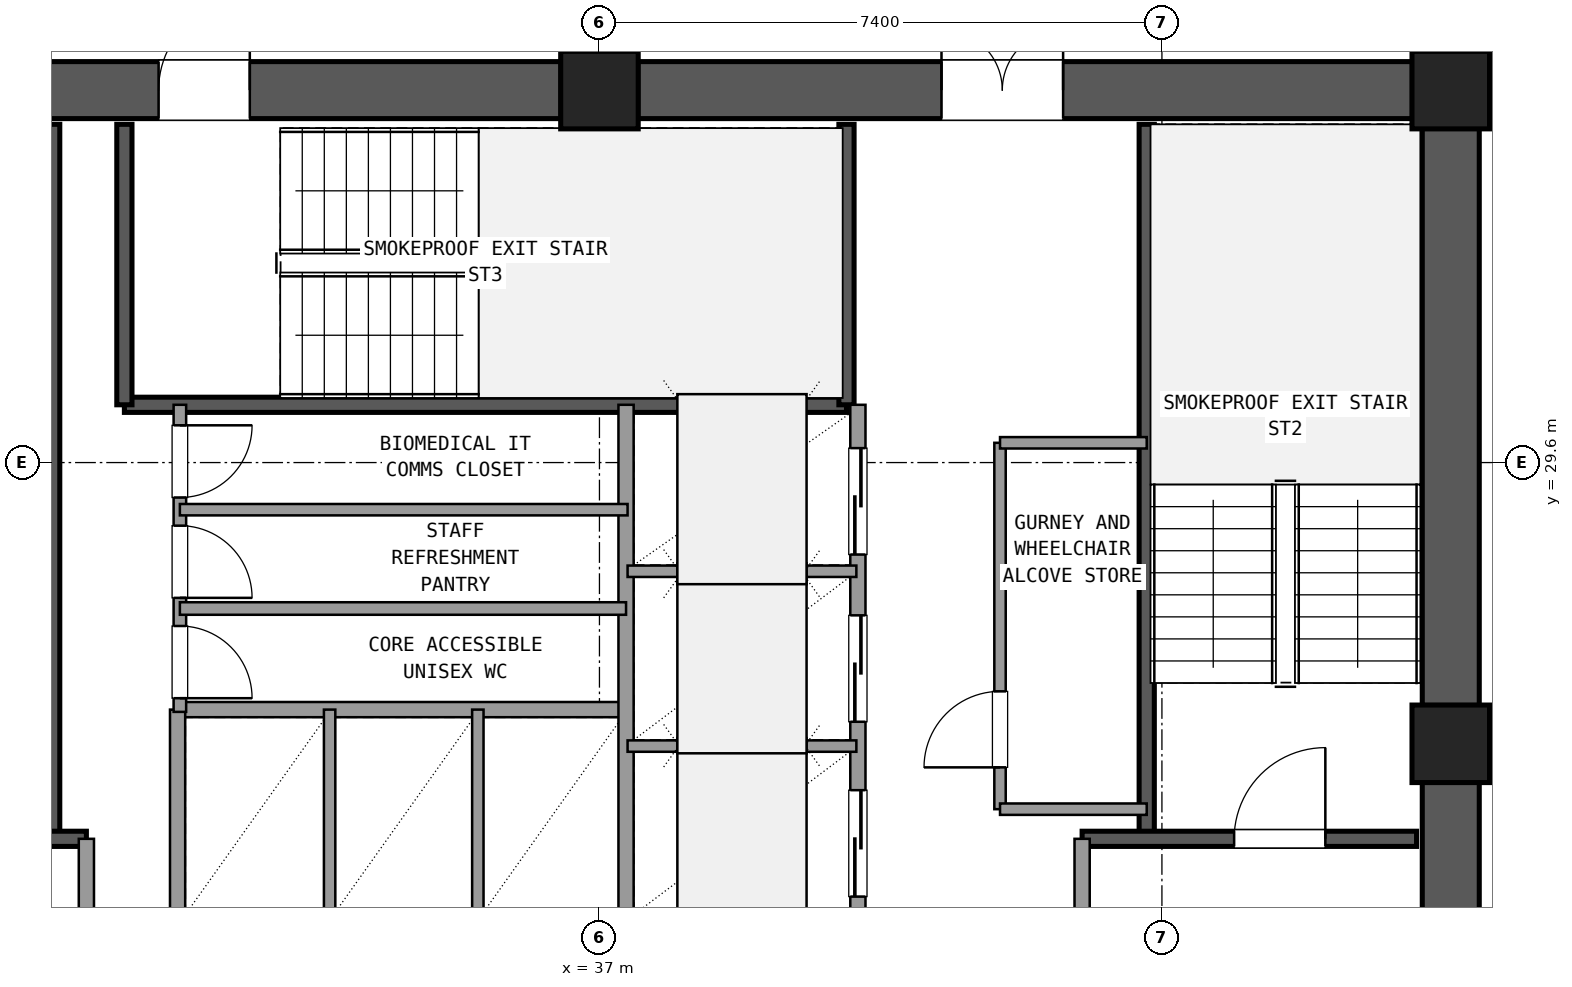
"""IFC4 building model, lengths in metres.
Left out: names, types, materials, properties, quantities, classifications, styles, units other than length and angle.
Written with IfcOpenShell. Run it as: python <this file> out.ifc"""

import sys

from ifc_helpers import new_model, si_unit, direction, frame, frame_2d, origin, origin_2d, place, context, subcontext, project, spatial, rectangle, extrude, element, fill, save


model = new_model("IFC4")
c1 = context("Model", 3, precision=1e-05, world=origin(), true_north=direction((0.0, 1.0)))
c2 = subcontext(c1, "Body", "Model", "MODEL_VIEW")
j1 = project(units=[si_unit("LENGTHUNIT", "METRE"), si_unit("PLANEANGLEUNIT", "RADIAN")], contexts=[c1])
p1 = place(None, origin())
s1 = spatial("IfcSite", under=j1, at=p1, CompositionType="ELEMENT")
p2 = place(p1, origin())
s2 = spatial("IfcBuilding", under=s1, at=p2, CompositionType="ELEMENT")
p3 = place(p2, frame((0.0, 0.0, 106.38)))
s3 = spatial("IfcBuildingStorey", under=s2, at=p3, CompositionType="ELEMENT", Elevation=106.38)
for number, where, z_axis, x_axis in (
    (1, (48.2, 25.9, 0.0), (0.0, 0.0, 1.0), (1.0, 0.0, 0.0)),
    (2, (48.2, 34.5, 0.0), (0.0, 0.0, 1.0), (1.0, 0.0, 0.0)),
    (3, (37.0, 34.5, 0.0), (0.0, 0.0, 1.0), (1.0, 0.0, 0.0)),
):
    element("IfcColumn", number, at=place(p3, frame(where, z_axis=z_axis, x_axis=x_axis)), inside=s3, PredefinedType="COLUMN", context=c2, shape_type="SweptSolid", body=[
        extrude(rectangle(XDim=1.02, YDim=1.02, at=origin_2d()), origin(), (0.0, 0.0, 1.0), 3.6),
    ])
p4 = place(p3, frame((48.2, 17.805, 0.0), z_axis=(0.0, 0.0, 1.0), x_axis=(0.0, 1.0, 0.0)))
e4 = element("IfcWall", 4, at=p4, inside=s3, PredefinedType="SHEAR", context=c2, shape_type="SweptSolid", body=[
    extrude(rectangle(XDim=7.59, YDim=0.75, at=frame_2d((3.795, 0.0))), origin(), (0.0, 0.0, 1.0), 3.32),
])
p5 = place(p4, frame((4.245, 0.0, 0.0)))
e5 = element("IfcOpeningElement", 5, at=p5, cuts=e4, PredefinedType="OPENING", context=c2, shape_type="SweptSolid", body=[
    extrude(rectangle(XDim=1.2, YDim=2.15, at=frame_2d((0.6, 1.075))), frame((0.0, 0.385, 0.0), z_axis=(0.0, -1.0, 0.0), x_axis=(1.0, 0.0, 0.0)), (0.0, 0.0, 1.0), 0.77),
])
p6 = place(p3, frame((48.2, 26.405, 0.0), z_axis=(0.0, 0.0, 1.0), x_axis=(0.0, 1.0, 0.0)))
e6 = element("IfcWall", 6, at=p6, inside=s3, PredefinedType="SHEAR", context=c2, shape_type="SweptSolid", body=[
    extrude(rectangle(XDim=7.59, YDim=0.75, at=frame_2d((3.795, 0.0))), origin(), (0.0, 0.0, 1.0), 3.32),
])
p7 = place(p3, frame((47.695, 34.5, 0.0), z_axis=(0.0, 0.0, 1.0), x_axis=(-1.0, 0.0, 0.0)))
e7 = element("IfcWall", 7, at=p7, inside=s3, PredefinedType="SHEAR", context=c2, shape_type="SweptSolid", body=[
    extrude(rectangle(XDim=10.19, YDim=0.75, at=frame_2d((5.095, 0.0))), origin(), (0.0, 0.0, 1.0), 3.32),
])
p8 = place(p7, frame((4.595, 0.0, 0.0)))
e8 = element("IfcOpeningElement", 8, at=p8, cuts=e7, PredefinedType="OPENING", context=c2, shape_type="SweptSolid", body=[
    extrude(rectangle(XDim=1.6, YDim=2.2, at=frame_2d((0.8, 1.1))), frame((0.0, 0.385, 0.0), z_axis=(0.0, -1.0, 0.0), x_axis=(1.0, 0.0, 0.0)), (0.0, 0.0, 1.0), 0.77),
])
p9 = place(p3, frame((36.495, 34.5, 0.0), z_axis=(0.0, 0.0, 1.0), x_axis=(-1.0, 0.0, 0.0)))
e9 = element("IfcWall", 9, at=p9, inside=s3, PredefinedType="SHEAR", context=c2, shape_type="SweptSolid", body=[
    extrude(rectangle(XDim=10.19, YDim=0.75, at=frame_2d((5.095, 0.0))), origin(), (0.0, 0.0, 1.0), 3.32),
])
p10 = place(p9, frame((4.095, 0.0, 0.0)))
e10 = element("IfcOpeningElement", 10, at=p10, cuts=e9, PredefinedType="OPENING", context=c2, shape_type="SweptSolid", body=[
    extrude(rectangle(XDim=1.2, YDim=2.15, at=frame_2d((0.6, 1.075))), frame((0.0, 0.385, 0.0), z_axis=(0.0, -1.0, 0.0), x_axis=(1.0, 0.0, 0.0)), (0.0, 0.0, 1.0), 0.77),
])
p11 = place(p3, frame((29.8, 24.65, 0.0), z_axis=(0.0, 0.0, 1.0), x_axis=(0.0, 1.0, 0.0)))
e11 = element("IfcWall", 11, at=p11, inside=s3, PredefinedType="SHEAR", context=c2, shape_type="SweptSolid", body=[
    extrude(rectangle(XDim=9.4, YDim=0.2, at=frame_2d((4.7, 0.0))), origin(), (0.0, 0.0, 1.0), 3.32),
])
p12 = place(p3, frame((26.25, 24.65, 0.0), z_axis=(0.0, 0.0, 1.0), x_axis=(1.0, 0.0, 0.0)))
e12 = element("IfcWall", 12, at=p12, inside=s3, PredefinedType="SHEAR", context=c2, shape_type="SweptSolid", body=[
    extrude(rectangle(XDim=4.0, YDim=0.2, at=frame_2d((2.0, 0.0))), origin(), (0.0, 0.0, 1.0), 3.32),
])
p13 = place(p12, frame((1.0, 0.0, 0.0)))
e13 = element("IfcOpeningElement", 13, at=p13, cuts=e12, PredefinedType="OPENING", context=c2, shape_type="SweptSolid", body=[
    extrude(rectangle(XDim=1.2, YDim=2.15, at=frame_2d((0.6, 1.075))), frame((0.0, 0.11, 0.0), z_axis=(0.0, -1.0, 0.0), x_axis=(1.0, 0.0, 0.0)), (0.0, 0.0, 1.0), 0.22),
])
p14 = place(p3, frame((44.2, 24.65, 0.0), z_axis=(0.0, 0.0, 1.0), x_axis=(0.0, 1.0, 0.0)))
e14 = element("IfcWall", 14, at=p14, inside=s3, PredefinedType="SHEAR", context=c2, shape_type="SweptSolid", body=[
    extrude(rectangle(XDim=9.4, YDim=0.2, at=frame_2d((4.7, 0.0))), origin(), (0.0, 0.0, 1.0), 3.32),
])
p15 = place(p3, frame((43.35, 24.65, 0.0), z_axis=(0.0, 0.0, 1.0), x_axis=(1.0, 0.0, 0.0)))
e15 = element("IfcWall", 15, at=p15, inside=s3, PredefinedType="SHEAR", context=c2, shape_type="SweptSolid", body=[
    extrude(rectangle(XDim=4.4, YDim=0.2, at=frame_2d((2.2, 0.0))), origin(), (0.0, 0.0, 1.0), 3.32),
])
p16 = place(p15, frame((2.0, 0.0, 0.0)))
e16 = element("IfcOpeningElement", 16, at=p16, cuts=e15, PredefinedType="OPENING", context=c2, shape_type="SweptSolid", body=[
    extrude(rectangle(XDim=1.2, YDim=2.15, at=frame_2d((0.6, 1.075))), frame((0.0, 0.11, 0.0), z_axis=(0.0, -1.0, 0.0), x_axis=(1.0, 0.0, 0.0)), (0.0, 0.0, 1.0), 0.22),
])
p17 = place(p3, frame((30.75, 30.36, 0.0), z_axis=(0.0, 0.0, 1.0), x_axis=(1.0, 0.0, 0.0)))
e17 = element("IfcWall", 17, at=p17, inside=s3, PredefinedType="SHEAR", context=c2, shape_type="SweptSolid", body=[
    extrude(rectangle(XDim=9.5, YDim=0.2, at=frame_2d((4.75, 0.0))), origin(), (0.0, 0.0, 1.0), 3.32),
])
for number, where, z_axis, x_axis in (
    (18, (30.75, 30.36, 0.0), (0.0, 0.0, 1.0), (0.0, 1.0, 0.0)),
    (19, (40.25, 30.36, 0.0), (0.0, 0.0, 1.0), (0.0, 1.0, 0.0)),
):
    element("IfcWall", number, at=place(p3, frame(where, z_axis=z_axis, x_axis=x_axis)), inside=s3, PredefinedType="SHEAR", context=c2, shape_type="SweptSolid", body=[
        extrude(rectangle(XDim=3.69, YDim=0.2, at=frame_2d((1.845, 0.0))), origin(), (0.0, 0.0, 1.0), 3.32),
    ])
p18 = place(p3, frame((30.25, 17.75, 0.0), z_axis=(0.0, 0.0, 1.0), x_axis=(0.0, 1.0, 0.0)))
e20 = element("IfcWall", 20, at=p18, inside=s3, PredefinedType="SOLIDWALL", context=c2, shape_type="SweptSolid", body=[
    extrude(rectangle(XDim=6.9, YDim=0.2, at=frame_2d((3.45, 0.0))), origin(), (0.0, 0.0, 1.0), 2.61),
])
p19 = place(p18, frame((4.15, 0.0, 0.0)))
e21 = element("IfcOpeningElement", 21, at=p19, cuts=e20, PredefinedType="OPENING", context=c2, shape_type="SweptSolid", body=[
    extrude(rectangle(XDim=1.2, YDim=2.15, at=frame_2d((0.6, 1.075))), frame((0.0, 0.11, 0.0), z_axis=(0.0, -1.0, 0.0), x_axis=(1.0, 0.0, 0.0)), (0.0, 0.0, 1.0), 0.22),
])
p20 = place(p3, frame((43.35, 17.75, 0.0), z_axis=(0.0, 0.0, 1.0), x_axis=(0.0, 1.0, 0.0)))
e22 = element("IfcWall", 22, at=p20, inside=s3, PredefinedType="SOLIDWALL", context=c2, shape_type="SweptSolid", body=[
    extrude(rectangle(XDim=6.9, YDim=0.2, at=frame_2d((3.45, 0.0))), origin(), (0.0, 0.0, 1.0), 2.61),
])
p21 = place(p20, frame((4.15, 0.0, 0.0)))
e23 = element("IfcOpeningElement", 23, at=p21, cuts=e22, PredefinedType="OPENING", context=c2, shape_type="SweptSolid", body=[
    extrude(rectangle(XDim=1.2, YDim=2.15, at=frame_2d((0.6, 1.075))), frame((0.0, 0.11, 0.0), z_axis=(0.0, -1.0, 0.0), x_axis=(1.0, 0.0, 0.0)), (0.0, 0.0, 1.0), 0.22),
])
p22 = place(p3, frame((31.45, 26.35, 0.0), z_axis=(0.0, 0.0, 1.0), x_axis=(1.0, 0.0, 0.0)))
e24 = element("IfcWall", 24, at=p22, inside=s3, PredefinedType="SOLIDWALL", context=c2, shape_type="SweptSolid", body=[
    extrude(rectangle(XDim=5.9, YDim=0.2, at=frame_2d((2.95, 0.0))), origin(), (0.0, 0.0, 1.0), 2.61),
])
p23 = place(p3, frame((31.45, 23.54, 0.0), z_axis=(0.0, 0.0, 1.0), x_axis=(0.0, 1.0, 0.0)))
e25 = element("IfcWall", 25, at=p23, inside=s3, PredefinedType="SOLIDWALL", context=c2, shape_type="SweptSolid", body=[
    extrude(rectangle(XDim=2.81, YDim=0.2, at=frame_2d((1.405, 0.0))), origin(), (0.0, 0.0, 1.0), 2.61),
])
for number, where, z_axis, x_axis in (
    (26, (33.45, 23.54, 0.0), (0.0, 0.0, 1.0), (0.0, 1.0, 0.0)),
    (27, (35.4, 23.54, 0.0), (0.0, 0.0, 1.0), (0.0, 1.0, 0.0)),
):
    element("IfcWall", number, at=place(p3, frame(where, z_axis=z_axis, x_axis=x_axis)), inside=s3, PredefinedType="PARTITIONING", context=c2, shape_type="SweptSolid", body=[
        extrude(rectangle(XDim=2.81, YDim=0.15, at=frame_2d((1.405, 0.0))), origin(), (0.0, 0.0, 1.0), 2.61),
    ])
p24 = place(p3, frame((37.35, 23.54, 0.0), z_axis=(0.0, 0.0, 1.0), x_axis=(0.0, 1.0, 0.0)))
e28 = element("IfcWall", 28, at=p24, inside=s3, PredefinedType="SOLIDWALL", context=c2, shape_type="SweptSolid", body=[
    extrude(rectangle(XDim=6.82, YDim=0.2, at=frame_2d((3.41, 0.0))), origin(), (0.0, 0.0, 1.0), 2.61),
])
p25 = place(p3, frame((40.4, 23.54, 0.0), z_axis=(0.0, 0.0, 1.0), x_axis=(0.0, 1.0, 0.0)))
e29 = element("IfcWall", 29, at=p25, inside=s3, PredefinedType="SOLIDWALL", context=c2, shape_type="SweptSolid", body=[
    extrude(rectangle(XDim=6.82, YDim=0.2, at=frame_2d((3.41, 0.0))), origin(), (0.0, 0.0, 1.0), 2.61),
])
p26 = place(p25, frame((0.35, 0.0, 0.0)))
e30 = element("IfcOpeningElement", 30, at=p26, cuts=e29, PredefinedType="OPENING", context=c2, shape_type="SweptSolid", body=[
    extrude(rectangle(XDim=1.4, YDim=2.2, at=frame_2d((0.7, 1.1))), frame((0.0, 0.11, 0.0), z_axis=(0.0, -1.0, 0.0), x_axis=(1.0, 0.0, 0.0)), (0.0, 0.0, 1.0), 0.22),
])
p27 = place(p25, frame((2.65, 0.0, 0.0)))
e31 = element("IfcOpeningElement", 31, at=p27, cuts=e29, PredefinedType="OPENING", context=c2, shape_type="SweptSolid", body=[
    extrude(rectangle(XDim=1.4, YDim=2.2, at=frame_2d((0.7, 1.1))), frame((0.0, 0.11, 0.0), z_axis=(0.0, -1.0, 0.0), x_axis=(1.0, 0.0, 0.0)), (0.0, 0.0, 1.0), 0.22),
])
p28 = place(p25, frame((4.85, 0.0, 0.0)))
e32 = element("IfcOpeningElement", 32, at=p28, cuts=e29, PredefinedType="OPENING", context=c2, shape_type="SweptSolid", body=[
    extrude(rectangle(XDim=1.4, YDim=2.2, at=frame_2d((0.7, 1.1))), frame((0.0, 0.11, 0.0), z_axis=(0.0, -1.0, 0.0), x_axis=(1.0, 0.0, 0.0)), (0.0, 0.0, 1.0), 0.22),
])
for number, where, z_axis, x_axis in (
    (33, (37.37, 25.87, 0.0), (0.0, 0.0, 1.0), (1.0, 0.0, 0.0)),
    (34, (37.37, 28.17, 0.0), (0.0, 0.0, 1.0), (1.0, 0.0, 0.0)),
):
    element("IfcWall", number, at=place(p3, frame(where, z_axis=z_axis, x_axis=x_axis)), inside=s3, PredefinedType="PARTITIONING", context=c2, shape_type="SweptSolid", body=[
        extrude(rectangle(XDim=3.01, YDim=0.15, at=frame_2d((1.505, 0.0))), origin(), (0.0, 0.0, 1.0), 2.61),
    ])
p29 = place(p3, frame((42.27, 25.04, 0.0), z_axis=(0.0, 0.0, 1.0), x_axis=(0.0, 1.0, 0.0)))
e35 = element("IfcWall", 35, at=p29, inside=s3, PredefinedType="PARTITIONING", context=c2, shape_type="SweptSolid", body=[
    extrude(rectangle(XDim=4.82, YDim=0.15, at=frame_2d((2.41, 0.0))), origin(), (0.0, 0.0, 1.0), 2.61),
])
p30 = place(p29, frame((0.55, 0.0, 0.0)))
e36 = element("IfcOpeningElement", 36, at=p30, cuts=e35, PredefinedType="OPENING", context=c2, shape_type="SweptSolid", body=[
    extrude(rectangle(XDim=1.0, YDim=2.15, at=frame_2d((0.5, 1.075))), frame((0.0, 0.085, 0.0), z_axis=(0.0, -1.0, 0.0), x_axis=(1.0, 0.0, 0.0)), (0.0, 0.0, 1.0), 0.17),
])
for number, where, z_axis, x_axis in (
    (37, (42.27, 25.04, 0.0), (0.0, 0.0, 1.0), (1.0, 0.0, 0.0)),
    (38, (42.27, 29.86, 0.0), (0.0, 0.0, 1.0), (1.0, 0.0, 0.0)),
):
    element("IfcWall", number, at=place(p3, frame(where, z_axis=z_axis, x_axis=x_axis)), inside=s3, PredefinedType="PARTITIONING", context=c2, shape_type="SweptSolid", body=[
        extrude(rectangle(XDim=1.93, YDim=0.15, at=frame_2d((0.965, 0.0))), origin(), (0.0, 0.0, 1.0), 2.61),
    ])
p31 = place(p3, frame((31.48, 26.32, 0.0), z_axis=(0.0, 0.0, 1.0), x_axis=(0.0, 1.0, 0.0)))
e39 = element("IfcWall", 39, at=p31, inside=s3, PredefinedType="PLUMBINGWALL", context=c2, shape_type="SweptSolid", body=[
    extrude(rectangle(XDim=4.04, YDim=0.165, at=frame_2d((2.02, 0.0))), origin(), (0.0, 0.0, 1.0), 2.61),
])
p32 = place(p31, frame((0.18, 0.0, 0.0)))
e40 = element("IfcOpeningElement", 40, at=p32, cuts=e39, PredefinedType="OPENING", context=c2, shape_type="SweptSolid", body=[
    extrude(rectangle(XDim=0.95, YDim=2.1, at=frame_2d((0.475, 1.05))), frame((0.0, 0.093, 0.0), z_axis=(0.0, -1.0, 0.0), x_axis=(1.0, 0.0, 0.0)), (0.0, 0.0, 1.0), 0.185),
])
p33 = place(p31, frame((1.5, 0.0, 0.0)))
e41 = element("IfcOpeningElement", 41, at=p33, cuts=e39, PredefinedType="OPENING", context=c2, shape_type="SweptSolid", body=[
    extrude(rectangle(XDim=0.95, YDim=2.1, at=frame_2d((0.475, 1.05))), frame((0.0, 0.093, 0.0), z_axis=(0.0, -1.0, 0.0), x_axis=(1.0, 0.0, 0.0)), (0.0, 0.0, 1.0), 0.185),
])
p34 = place(p31, frame((2.82, 0.0, 0.0)))
e42 = element("IfcOpeningElement", 42, at=p34, cuts=e39, PredefinedType="OPENING", context=c2, shape_type="SweptSolid", body=[
    extrude(rectangle(XDim=0.95, YDim=2.1, at=frame_2d((0.475, 1.05))), frame((0.0, 0.093, 0.0), z_axis=(0.0, -1.0, 0.0), x_axis=(1.0, 0.0, 0.0)), (0.0, 0.0, 1.0), 0.185),
])
p35 = place(p3, frame((31.48, 27.68, 0.0), z_axis=(0.0, 0.0, 1.0), x_axis=(1.0, 0.0, 0.0)))
e43 = element("IfcWall", 43, at=p35, inside=s3, PredefinedType="PLUMBINGWALL", context=c2, shape_type="SweptSolid", body=[
    extrude(rectangle(XDim=5.87, YDim=0.165, at=frame_2d((2.935, 0.0))), origin(), (0.0, 0.0, 1.0), 2.61),
])
p36 = place(p3, frame((31.48, 28.98, 0.0), z_axis=(0.0, 0.0, 1.0), x_axis=(1.0, 0.0, 0.0)))
e44 = element("IfcWall", 44, at=p36, inside=s3, PredefinedType="PARTITIONING", context=c2, shape_type="SweptSolid", body=[
    extrude(rectangle(XDim=5.89, YDim=0.15, at=frame_2d((2.945, 0.0))), origin(), (0.0, 0.0, 1.0), 2.61),
])
p37 = place(p3, frame((37.0, 34.95, 0.0), z_axis=(0.0, 0.0, 1.0), x_axis=(0.0, 1.0, 0.0)))
e45 = element("IfcWall", 45, at=p37, inside=s3, PredefinedType="PARTITIONING", context=c2, shape_type="SweptSolid", body=[
    extrude(rectangle(XDim=3.21, YDim=0.18, at=frame_2d((1.605, 0.0))), origin(), (0.0, 0.0, 1.0), 2.61),
])
p38 = place(p37, frame((0.605, 0.0, 0.0)))
e46 = element("IfcOpeningElement", 46, at=p38, cuts=e45, PredefinedType="OPENING", context=c2, shape_type="SweptSolid", body=[
    extrude(rectangle(XDim=2.0, YDim=2.2, at=frame_2d((1.0, 1.1))), frame((0.0, 0.1, 0.0), z_axis=(0.0, -1.0, 0.0), x_axis=(1.0, 0.0, 0.0)), (0.0, 0.0, 1.0), 0.2),
])
p39 = place(p16, origin())
e47 = element("IfcDoor", 47, at=p39, inside=s3, OperationType="SINGLE_SWING_RIGHT", PredefinedType="DOOR", context=c2, shape_type="SweptSolid", body=[
    extrude(rectangle(XDim=1.2, YDim=2.15, at=frame_2d((0.6, 1.075))), frame((0.0, 0.025, 0.0), z_axis=(0.0, -1.0, 0.0), x_axis=(1.0, 0.0, 0.0)), (0.0, 0.0, 1.0), 0.05),
])
fill(e16, e47)
p40 = place(p8, frame((1.6, 0.0, 0.0), z_axis=(0.0, 0.0, 1.0), x_axis=(-1.0, 0.0, 0.0)))
e48 = element("IfcDoor", 48, at=p40, inside=s3, OperationType="DOUBLE_DOOR_SINGLE_SWING", PredefinedType="DOOR", context=c2, shape_type="SweptSolid", body=[
    extrude(rectangle(XDim=1.6, YDim=2.2, at=frame_2d((0.8, 1.1))), frame((0.0, 0.025, 0.0), z_axis=(0.0, -1.0, 0.0), x_axis=(1.0, 0.0, 0.0)), (0.0, 0.0, 1.0), 0.05),
])
fill(e8, e48)
p41 = place(p10, frame((1.2, 0.0, 0.0), z_axis=(0.0, 0.0, 1.0), x_axis=(-1.0, 0.0, 0.0)))
e49 = element("IfcDoor", 49, at=p41, inside=s3, OperationType="SINGLE_SWING_LEFT", PredefinedType="DOOR", context=c2, shape_type="SweptSolid", body=[
    extrude(rectangle(XDim=1.2, YDim=2.15, at=frame_2d((0.6, 1.075))), frame((0.0, 0.025, 0.0), z_axis=(0.0, -1.0, 0.0), x_axis=(1.0, 0.0, 0.0)), (0.0, 0.0, 1.0), 0.05),
])
fill(e10, e49)
p42 = place(p26, origin())
e50 = element("IfcDoor", 50, at=p42, inside=s3, OperationType="SLIDING_TO_LEFT", PredefinedType="DOOR", context=c2, shape_type="SweptSolid", body=[
    extrude(rectangle(XDim=1.4, YDim=2.2, at=frame_2d((0.7, 1.1))), frame((0.0, 0.025, 0.0), z_axis=(0.0, -1.0, 0.0), x_axis=(1.0, 0.0, 0.0)), (0.0, 0.0, 1.0), 0.05),
])
fill(e30, e50)
p43 = place(p27, origin())
e51 = element("IfcDoor", 51, at=p43, inside=s3, OperationType="SLIDING_TO_LEFT", PredefinedType="DOOR", context=c2, shape_type="SweptSolid", body=[
    extrude(rectangle(XDim=1.4, YDim=2.2, at=frame_2d((0.7, 1.1))), frame((0.0, 0.025, 0.0), z_axis=(0.0, -1.0, 0.0), x_axis=(1.0, 0.0, 0.0)), (0.0, 0.0, 1.0), 0.05),
])
fill(e31, e51)
p44 = place(p28, origin())
e52 = element("IfcDoor", 52, at=p44, inside=s3, OperationType="SLIDING_TO_RIGHT", PredefinedType="DOOR", context=c2, shape_type="SweptSolid", body=[
    extrude(rectangle(XDim=1.4, YDim=2.2, at=frame_2d((0.7, 1.1))), frame((0.0, 0.025, 0.0), z_axis=(0.0, -1.0, 0.0), x_axis=(1.0, 0.0, 0.0)), (0.0, 0.0, 1.0), 0.05),
])
fill(e32, e52)
p45 = place(p30, origin())
e53 = element("IfcDoor", 53, at=p45, inside=s3, OperationType="SINGLE_SWING_LEFT", PredefinedType="DOOR", context=c2, shape_type="SweptSolid", body=[
    extrude(rectangle(XDim=1.0, YDim=2.15, at=frame_2d((0.5, 1.075))), frame((0.0, 0.025, 0.0), z_axis=(0.0, -1.0, 0.0), x_axis=(1.0, 0.0, 0.0)), (0.0, 0.0, 1.0), 0.05),
])
fill(e36, e53)
p46 = place(p32, frame((0.95, 0.0, 0.0), z_axis=(0.0, 0.0, 1.0), x_axis=(-1.0, 0.0, 0.0)))
e54 = element("IfcDoor", 54, at=p46, inside=s3, OperationType="SINGLE_SWING_LEFT", PredefinedType="DOOR", context=c2, shape_type="SweptSolid", body=[
    extrude(rectangle(XDim=0.95, YDim=2.1, at=frame_2d((0.475, 1.05))), frame((0.0, 0.025, 0.0), z_axis=(0.0, -1.0, 0.0), x_axis=(1.0, 0.0, 0.0)), (0.0, 0.0, 1.0), 0.05),
])
fill(e40, e54)
p47 = place(p33, frame((0.95, 0.0, 0.0), z_axis=(0.0, 0.0, 1.0), x_axis=(-1.0, 0.0, 0.0)))
e55 = element("IfcDoor", 55, at=p47, inside=s3, OperationType="SINGLE_SWING_LEFT", PredefinedType="DOOR", context=c2, shape_type="SweptSolid", body=[
    extrude(rectangle(XDim=0.95, YDim=2.1, at=frame_2d((0.475, 1.05))), frame((0.0, 0.025, 0.0), z_axis=(0.0, -1.0, 0.0), x_axis=(1.0, 0.0, 0.0)), (0.0, 0.0, 1.0), 0.05),
])
fill(e41, e55)
p48 = place(p34, frame((0.95, 0.0, 0.0), z_axis=(0.0, 0.0, 1.0), x_axis=(-1.0, 0.0, 0.0)))
e56 = element("IfcDoor", 56, at=p48, inside=s3, OperationType="SINGLE_SWING_RIGHT", PredefinedType="DOOR", context=c2, shape_type="SweptSolid", body=[
    extrude(rectangle(XDim=0.95, YDim=2.1, at=frame_2d((0.475, 1.05))), frame((0.0, 0.025, 0.0), z_axis=(0.0, -1.0, 0.0), x_axis=(1.0, 0.0, 0.0)), (0.0, 0.0, 1.0), 0.05),
])
fill(e42, e56)
save(model, sys.argv[1])
